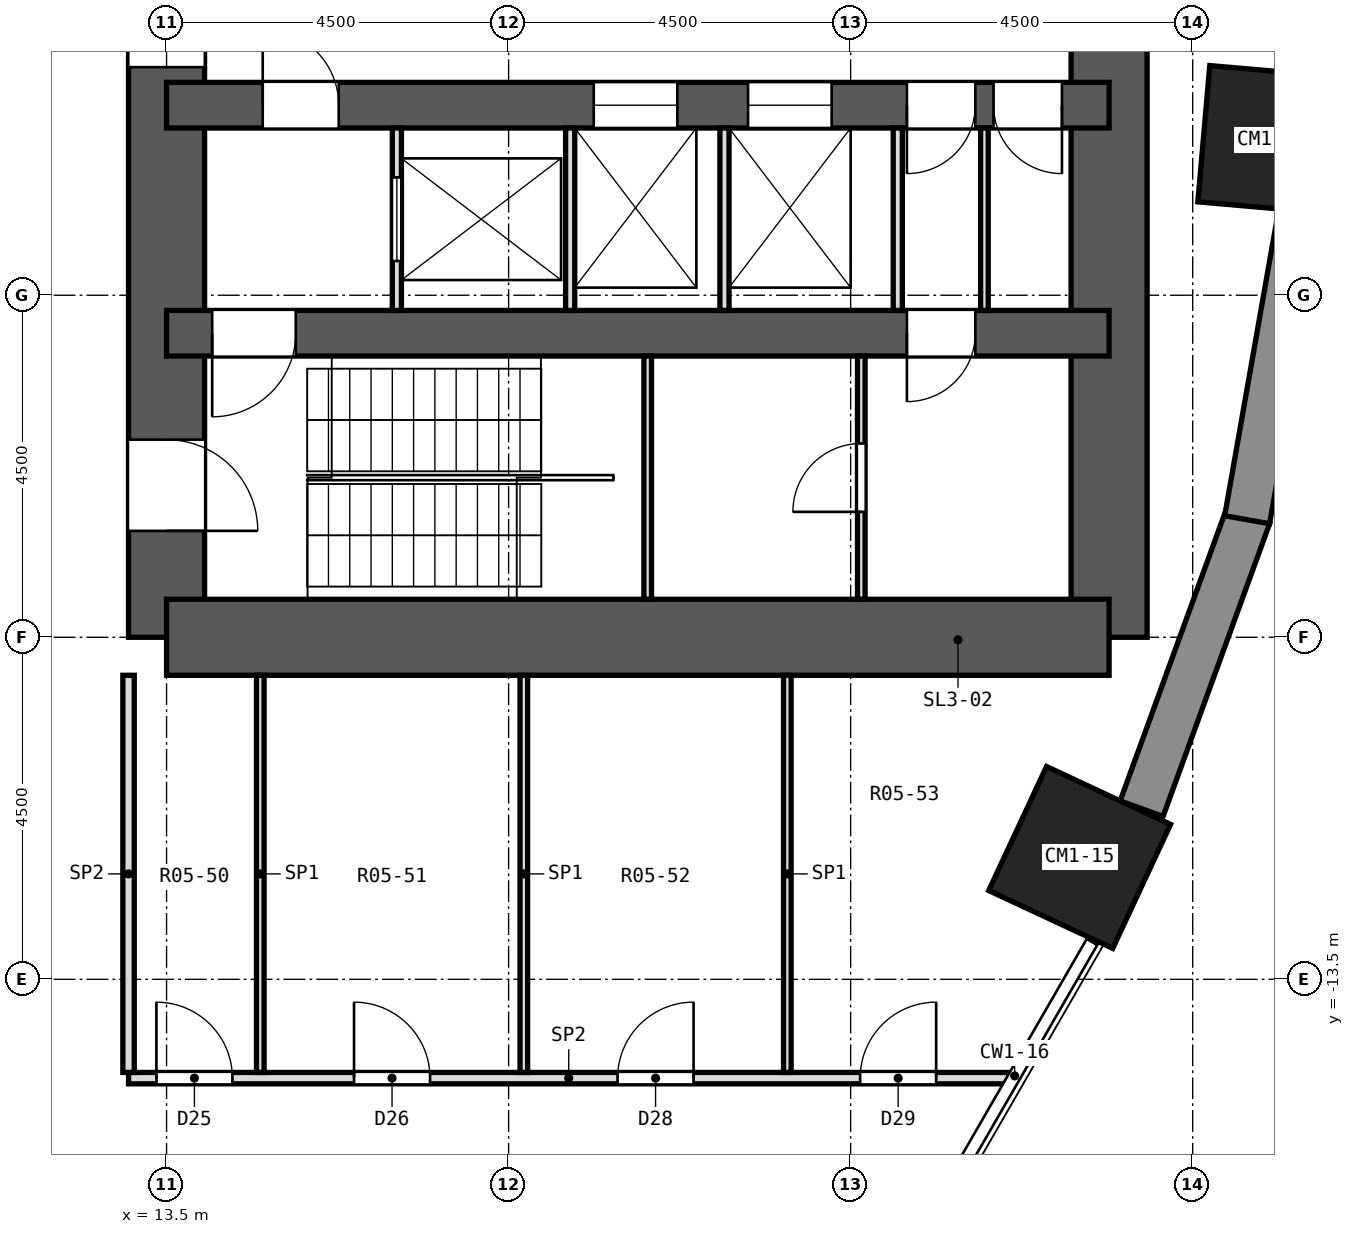
"""IFC4 building model, lengths in metres.
Left out: names, types, materials, properties, quantities, classifications, styles, units other than length and angle.
Written with IfcOpenShell. Run it as: python <this file> out.ifc"""

import sys

from ifc_helpers import new_model, si_unit, direction, frame, frame_2d, origin, origin_2d, place, context, subcontext, project, spatial, rectangle, extrude, element, fill, save


model = new_model("IFC4")
c1 = context("Model", 3, precision=1e-05, world=origin(), true_north=direction((0.0, 1.0)))
c2 = subcontext(c1, "Body", "Model", "MODEL_VIEW")
j1 = project(units=[si_unit("LENGTHUNIT", "METRE"), si_unit("PLANEANGLEUNIT", "RADIAN")], contexts=[c1])
p1 = place(None, origin())
s1 = spatial("IfcSite", under=j1, at=p1, CompositionType="ELEMENT")
p2 = place(p1, origin())
s2 = spatial("IfcBuilding", under=s1, at=p2, CompositionType="ELEMENT")
p3 = place(p2, frame((0.0, 0.0, 9.2)))
s3 = spatial("IfcBuildingStorey", under=s2, at=p3, CompositionType="ELEMENT", Elevation=9.2)
for number, where, z_axis, x_axis in (
    (1, (25.512, -11.897, 0.0), (0.0, 0.0, 1.0), (0.906, -0.423, 0.0)),
    (2, (28.043, -2.453, 0.0), (0.0, 0.0, 1.0), (0.996, -0.087, 0.0)),
):
    element("IfcColumn", number, at=place(p3, frame(where, z_axis=z_axis, x_axis=x_axis)), inside=s3, PredefinedType="COLUMN", context=c2, shape_type="SweptSolid", body=[
        extrude(rectangle(XDim=1.8, YDim=1.8, at=origin_2d()), origin(), (0.0, 0.0, 1.0), 4.2),
    ])
p4 = place(p3, frame((13.5, -9.0, 0.0), z_axis=(0.0, 0.0, 1.0), x_axis=(0.0, 1.0, 0.0)))
e3 = element("IfcWall", 3, at=p4, inside=s3, PredefinedType="SHEAR", context=c2, shape_type="SweptSolid", body=[
    extrude(rectangle(XDim=18.0, YDim=1.0, at=frame_2d((9.0, 0.0))), origin(), (0.0, 0.0, 1.0), 4.2),
])
p5 = place(p4, frame((15.4, 0.0, 0.0)))
e4 = element("IfcOpeningElement", 4, at=p5, cuts=e3, PredefinedType="OPENING", context=c2, shape_type="SweptSolid", body=[
    extrude(rectangle(XDim=1.2, YDim=2.1, at=frame_2d((0.6, 1.05))), frame((0.0, 0.512, 0.0), z_axis=(0.0, -1.0, 0.0), x_axis=(1.0, 0.0, 0.0)), (0.0, 0.0, 1.0), 1.024),
])
p6 = place(p4, frame((1.4, 0.0, 0.0)))
e5 = element("IfcOpeningElement", 5, at=p6, cuts=e3, PredefinedType="OPENING", context=c2, shape_type="SweptSolid", body=[
    extrude(rectangle(XDim=1.2, YDim=2.1, at=frame_2d((0.6, 1.05))), frame((0.0, 0.512, 0.0), z_axis=(0.0, -1.0, 0.0), x_axis=(1.0, 0.0, 0.0)), (0.0, 0.0, 1.0), 1.024),
])
p7 = place(p4, frame((7.5, 0.0, 0.0)))
e6 = element("IfcOpeningElement", 6, at=p7, cuts=e3, PredefinedType="OPENING", context=c2, shape_type="SweptSolid", body=[
    extrude(rectangle(XDim=3.0, YDim=2.4, at=frame_2d((1.5, 1.2))), frame((0.0, 0.512, 0.0), z_axis=(0.0, -1.0, 0.0), x_axis=(1.0, 0.0, 0.0)), (0.0, 0.0, 1.0), 1.024),
])
p8 = place(p3, frame((25.9, -9.0, 0.0), z_axis=(0.0, 0.0, 1.0), x_axis=(0.0, 1.0, 0.0)))
e7 = element("IfcWall", 7, at=p8, inside=s3, PredefinedType="SHEAR", context=c2, shape_type="SweptSolid", body=[
    extrude(rectangle(XDim=18.0, YDim=1.0, at=frame_2d((9.0, 0.0))), origin(), (0.0, 0.0, 1.0), 4.2),
])
p9 = place(p3, frame((13.5, -9.0, 0.0), z_axis=(0.0, 0.0, 1.0), x_axis=(1.0, 0.0, 0.0)))
e8 = element("IfcWall", 8, at=p9, inside=s3, PredefinedType="SHEAR", context=c2, shape_type="SweptSolid", body=[
    extrude(rectangle(XDim=12.4, YDim=1.0, at=frame_2d((6.2, 0.0))), origin(), (0.0, 0.0, 1.0), 4.2),
])
p10 = place(p3, frame((13.5, -5.0, 0.0), z_axis=(0.0, 0.0, 1.0), x_axis=(1.0, 0.0, 0.0)))
e9 = element("IfcWall", 9, at=p10, inside=s3, PredefinedType="SHEAR", context=c2, shape_type="SweptSolid", body=[
    extrude(rectangle(XDim=12.4, YDim=0.6, at=frame_2d((6.2, 0.0))), origin(), (0.0, 0.0, 1.0), 4.2),
])
p11 = place(p10, frame((9.74, 0.0, 0.0)))
e10 = element("IfcOpeningElement", 10, at=p11, cuts=e9, PredefinedType="OPENING", context=c2, shape_type="SweptSolid", body=[
    extrude(rectangle(XDim=0.9, YDim=2.1, at=frame_2d((0.45, 1.05))), frame((0.0, 0.312, 0.0), z_axis=(0.0, -1.0, 0.0), x_axis=(1.0, 0.0, 0.0)), (0.0, 0.0, 1.0), 0.624),
])
p12 = place(p10, frame((0.6, 0.0, 0.0)))
e11 = element("IfcOpeningElement", 11, at=p12, cuts=e9, PredefinedType="OPENING", context=c2, shape_type="SweptSolid", body=[
    extrude(rectangle(XDim=1.1, YDim=2.1, at=frame_2d((0.55, 1.05))), frame((0.0, 0.312, 0.0), z_axis=(0.0, -1.0, 0.0), x_axis=(1.0, 0.0, 0.0)), (0.0, 0.0, 1.0), 0.624),
])
p13 = place(p3, frame((13.5, -2.0, 0.0), z_axis=(0.0, 0.0, 1.0), x_axis=(1.0, 0.0, 0.0)))
e12 = element("IfcWall", 12, at=p13, inside=s3, PredefinedType="SHEAR", context=c2, shape_type="SweptSolid", body=[
    extrude(rectangle(XDim=12.4, YDim=0.6, at=frame_2d((6.2, 0.0))), origin(), (0.0, 0.0, 1.0), 4.2),
])
p14 = place(p13, frame((5.62, 0.0, 0.0)))
e13 = element("IfcOpeningElement", 13, at=p14, cuts=e12, PredefinedType="OPENING", context=c2, shape_type="SweptSolid", body=[
    extrude(rectangle(XDim=1.1, YDim=2.1, at=frame_2d((0.55, 1.05))), frame((0.0, 0.312, 0.0), z_axis=(0.0, -1.0, 0.0), x_axis=(1.0, 0.0, 0.0)), (0.0, 0.0, 1.0), 0.624),
])
p15 = place(p13, frame((7.65, 0.0, 0.0)))
e14 = element("IfcOpeningElement", 14, at=p15, cuts=e12, PredefinedType="OPENING", context=c2, shape_type="SweptSolid", body=[
    extrude(rectangle(XDim=1.1, YDim=2.1, at=frame_2d((0.55, 1.05))), frame((0.0, 0.312, 0.0), z_axis=(0.0, -1.0, 0.0), x_axis=(1.0, 0.0, 0.0)), (0.0, 0.0, 1.0), 0.624),
])
p16 = place(p13, frame((1.265, 0.0, 0.0)))
e15 = element("IfcOpeningElement", 15, at=p16, cuts=e12, PredefinedType="OPENING", context=c2, shape_type="SweptSolid", body=[
    extrude(rectangle(XDim=1.0, YDim=2.1, at=frame_2d((0.5, 1.05))), frame((0.0, 0.312, 0.0), z_axis=(0.0, -1.0, 0.0), x_axis=(1.0, 0.0, 0.0)), (0.0, 0.0, 1.0), 0.624),
])
p17 = place(p13, frame((9.74, 0.0, 0.0)))
e16 = element("IfcOpeningElement", 16, at=p17, cuts=e12, PredefinedType="OPENING", context=c2, shape_type="SweptSolid", body=[
    extrude(rectangle(XDim=0.9, YDim=2.1, at=frame_2d((0.45, 1.05))), frame((0.0, 0.312, 0.0), z_axis=(0.0, -1.0, 0.0), x_axis=(1.0, 0.0, 0.0)), (0.0, 0.0, 1.0), 0.624),
])
p18 = place(p13, frame((10.88, 0.0, 0.0)))
e17 = element("IfcOpeningElement", 17, at=p18, cuts=e12, PredefinedType="OPENING", context=c2, shape_type="SweptSolid", body=[
    extrude(rectangle(XDim=0.9, YDim=2.1, at=frame_2d((0.45, 1.05))), frame((0.0, 0.312, 0.0), z_axis=(0.0, -1.0, 0.0), x_axis=(1.0, 0.0, 0.0)), (0.0, 0.0, 1.0), 0.624),
])
p19 = place(p3, frame((26.328, -11.255, 0.0), z_axis=(0.0, 0.0, 1.0), x_axis=(0.342034744565, 0.939687306241, 0.0)))
e18 = element("IfcWall", 18, at=p19, inside=s3, PredefinedType="SOLIDWALL", context=c2, shape_type="SweptSolid", body=[
    extrude(rectangle(XDim=4.099, YDim=0.6, at=frame_2d((2.05, 0.0))), origin(), (0.0, 0.0, 1.0), 3.65),
])
p20 = place(p3, frame((27.716, -7.454, 0.0), z_axis=(0.0, 0.0, 1.0), x_axis=(0.173673210505, 0.984803338719, 0.0)))
e19 = element("IfcWall", 19, at=p20, inside=s3, PredefinedType="SOLIDWALL", context=c2, shape_type="SweptSolid", body=[
    extrude(rectangle(XDim=4.099, YDim=0.6, at=frame_2d((2.05, 0.0))), origin(), (0.0, 0.0, 1.0), 3.65),
])
p21 = place(p3, frame((13.0, -14.8, 0.0), z_axis=(0.0, 0.0, 1.0), x_axis=(1.0, 0.0, 0.0)))
e20 = element("IfcWall", 20, at=p21, inside=s3, PredefinedType="PARTITIONING", context=c2, shape_type="SweptSolid", body=[
    extrude(rectangle(XDim=11.583, YDim=0.15, at=frame_2d((5.792, 0.0))), origin(), (0.0, 0.0, 1.0), 3.65),
])
p22 = place(p21, frame((0.366, 0.0, 0.0)))
e21 = element("IfcOpeningElement", 21, at=p22, cuts=e20, PredefinedType="OPENING", context=c2, shape_type="SweptSolid", body=[
    extrude(rectangle(XDim=1.0, YDim=2.1, at=frame_2d((0.5, 1.05))), frame((0.0, 0.087, 0.0), z_axis=(0.0, -1.0, 0.0), x_axis=(1.0, 0.0, 0.0)), (0.0, 0.0, 1.0), 0.174),
])
p23 = place(p21, frame((2.967, 0.0, 0.0)))
e22 = element("IfcOpeningElement", 22, at=p23, cuts=e20, PredefinedType="OPENING", context=c2, shape_type="SweptSolid", body=[
    extrude(rectangle(XDim=1.0, YDim=2.1, at=frame_2d((0.5, 1.05))), frame((0.0, 0.087, 0.0), z_axis=(0.0, -1.0, 0.0), x_axis=(1.0, 0.0, 0.0)), (0.0, 0.0, 1.0), 0.174),
])
p24 = place(p21, frame((6.434, 0.0, 0.0)))
e23 = element("IfcOpeningElement", 23, at=p24, cuts=e20, PredefinedType="OPENING", context=c2, shape_type="SweptSolid", body=[
    extrude(rectangle(XDim=1.0, YDim=2.1, at=frame_2d((0.5, 1.05))), frame((0.0, 0.087, 0.0), z_axis=(0.0, -1.0, 0.0), x_axis=(1.0, 0.0, 0.0)), (0.0, 0.0, 1.0), 0.174),
])
p25 = place(p21, frame((9.625, 0.0, 0.0)))
e24 = element("IfcOpeningElement", 24, at=p25, cuts=e20, PredefinedType="OPENING", context=c2, shape_type="SweptSolid", body=[
    extrude(rectangle(XDim=1.0, YDim=2.1, at=frame_2d((0.5, 1.05))), frame((0.0, 0.087, 0.0), z_axis=(0.0, -1.0, 0.0), x_axis=(1.0, 0.0, 0.0)), (0.0, 0.0, 1.0), 0.174),
])
for number, where, z_axis, x_axis in (
    (25, (21.667, -14.725, 0.0), (0.0, 0.0, 1.0), (0.0, 1.0, 0.0)),
    (26, (18.2, -14.725, 0.0), (0.0, 0.0, 1.0), (0.0, 1.0, 0.0)),
    (27, (14.733, -14.725, 0.0), (0.0, 0.0, 1.0), (0.0, 1.0, 0.0)),
):
    element("IfcWall", number, at=place(p3, frame(where, z_axis=z_axis, x_axis=x_axis)), inside=s3, PredefinedType="PARTITIONING", context=c2, shape_type="SweptSolid", body=[
        extrude(rectangle(XDim=5.225, YDim=0.1, at=frame_2d((2.613, 0.0))), origin(), (0.0, 0.0, 1.0), 3.65),
    ])
p26 = place(p3, frame((13.0, -14.725, 0.0), z_axis=(0.0, 0.0, 1.0), x_axis=(0.0, 1.0, 0.0)))
e28 = element("IfcWall", 28, at=p26, inside=s3, PredefinedType="PARTITIONING", context=c2, shape_type="SweptSolid", body=[
    extrude(rectangle(XDim=5.225, YDim=0.15, at=frame_2d((2.613, 0.0))), origin(), (0.0, 0.0, 1.0), 3.65),
])
p27 = place(p3, frame((16.53, -4.7, 0.0), z_axis=(0.0, 0.0, 1.0), x_axis=(0.0, 1.0, 0.0)))
e29 = element("IfcWall", 29, at=p27, inside=s3, PredefinedType="PARTITIONING", context=c2, shape_type="SweptSolid", body=[
    extrude(rectangle(XDim=2.4, YDim=0.12, at=frame_2d((1.2, 0.0))), origin(), (0.0, 0.0, 1.0), 3.65),
])
p28 = place(p27, frame((0.65, 0.0, 0.0)))
e30 = element("IfcOpeningElement", 30, at=p28, cuts=e29, PredefinedType="OPENING", context=c2, shape_type="SweptSolid", body=[
    extrude(rectangle(XDim=1.1, YDim=2.1, at=frame_2d((0.55, 1.05))), frame((0.0, 0.072, 0.0), z_axis=(0.0, -1.0, 0.0), x_axis=(1.0, 0.0, 0.0)), (0.0, 0.0, 1.0), 0.144),
])
for number, where, z_axis, x_axis in (
    (31, (18.81, -4.7, 0.0), (0.0, 0.0, 1.0), (0.0, 1.0, 0.0)),
    (32, (20.84, -4.7, 0.0), (0.0, 0.0, 1.0), (0.0, 1.0, 0.0)),
    (33, (23.12, -4.7, 0.0), (0.0, 0.0, 1.0), (0.0, 1.0, 0.0)),
):
    element("IfcWall", number, at=place(p3, frame(where, z_axis=z_axis, x_axis=x_axis)), inside=s3, PredefinedType="PARTITIONING", context=c2, shape_type="SweptSolid", body=[
        extrude(rectangle(XDim=2.4, YDim=0.12, at=frame_2d((1.2, 0.0))), origin(), (0.0, 0.0, 1.0), 3.65),
    ])
p29 = place(p3, frame((24.26, -4.7, 0.0), z_axis=(0.0, 0.0, 1.0), x_axis=(0.0, 1.0, 0.0)))
e34 = element("IfcWall", 34, at=p29, inside=s3, PredefinedType="PARTITIONING", context=c2, shape_type="SweptSolid", body=[
    extrude(rectangle(XDim=2.4, YDim=0.1, at=frame_2d((1.2, 0.0))), origin(), (0.0, 0.0, 1.0), 3.65),
])
p30 = place(p3, frame((19.83, -8.5, 0.0), z_axis=(0.0, 0.0, 1.0), x_axis=(0.0, 1.0, 0.0)))
e35 = element("IfcWall", 35, at=p30, inside=s3, PredefinedType="PARTITIONING", context=c2, shape_type="SweptSolid", body=[
    extrude(rectangle(XDim=3.2, YDim=0.1, at=frame_2d((1.6, 0.0))), origin(), (0.0, 0.0, 1.0), 3.65),
])
p31 = place(p3, frame((22.64, -8.5, 0.0), z_axis=(0.0, 0.0, 1.0), x_axis=(0.0, 1.0, 0.0)))
e36 = element("IfcWall", 36, at=p31, inside=s3, PredefinedType="PARTITIONING", context=c2, shape_type="SweptSolid", body=[
    extrude(rectangle(XDim=3.2, YDim=0.1, at=frame_2d((1.6, 0.0))), origin(), (0.0, 0.0, 1.0), 3.65),
])
p32 = place(p31, frame((1.15, 0.0, 0.0)))
e37 = element("IfcOpeningElement", 37, at=p32, cuts=e36, PredefinedType="OPENING", context=c2, shape_type="SweptSolid", body=[
    extrude(rectangle(XDim=0.9, YDim=2.1, at=frame_2d((0.45, 1.05))), frame((0.0, 0.062, 0.0), z_axis=(0.0, -1.0, 0.0), x_axis=(1.0, 0.0, 0.0)), (0.0, 0.0, 1.0), 0.124),
])
p33 = place(p22, origin())
e38 = element("IfcDoor", 38, at=p33, inside=s3, OperationType="SINGLE_SWING_LEFT", PredefinedType="DOOR", context=c2, shape_type="SweptSolid", body=[
    extrude(rectangle(XDim=1.0, YDim=2.1, at=frame_2d((0.5, 1.05))), frame((0.0, 0.025, 0.0), z_axis=(0.0, -1.0, 0.0), x_axis=(1.0, 0.0, 0.0)), (0.0, 0.0, 1.0), 0.05),
])
fill(e21, e38)
p34 = place(p23, origin())
e39 = element("IfcDoor", 39, at=p34, inside=s3, OperationType="SINGLE_SWING_LEFT", PredefinedType="DOOR", context=c2, shape_type="SweptSolid", body=[
    extrude(rectangle(XDim=1.0, YDim=2.1, at=frame_2d((0.5, 1.05))), frame((0.0, 0.025, 0.0), z_axis=(0.0, -1.0, 0.0), x_axis=(1.0, 0.0, 0.0)), (0.0, 0.0, 1.0), 0.05),
])
fill(e22, e39)
p35 = place(p24, origin())
e40 = element("IfcDoor", 40, at=p35, inside=s3, OperationType="SINGLE_SWING_RIGHT", PredefinedType="DOOR", context=c2, shape_type="SweptSolid", body=[
    extrude(rectangle(XDim=1.0, YDim=2.1, at=frame_2d((0.5, 1.05))), frame((0.0, 0.025, 0.0), z_axis=(0.0, -1.0, 0.0), x_axis=(1.0, 0.0, 0.0)), (0.0, 0.0, 1.0), 0.05),
])
fill(e23, e40)
p36 = place(p25, origin())
e41 = element("IfcDoor", 41, at=p36, inside=s3, OperationType="SINGLE_SWING_RIGHT", PredefinedType="DOOR", context=c2, shape_type="SweptSolid", body=[
    extrude(rectangle(XDim=1.0, YDim=2.1, at=frame_2d((0.5, 1.05))), frame((0.0, 0.025, 0.0), z_axis=(0.0, -1.0, 0.0), x_axis=(1.0, 0.0, 0.0)), (0.0, 0.0, 1.0), 0.05),
])
fill(e24, e41)
p37 = place(p28, origin())
e42 = element("IfcDoor", 42, at=p37, inside=s3, OperationType="DOUBLE_DOOR_SLIDING", PredefinedType="DOOR", context=c2, shape_type="SweptSolid", body=[
    extrude(rectangle(XDim=1.1, YDim=2.1, at=frame_2d((0.55, 1.05))), frame((0.0, 0.025, 0.0), z_axis=(0.0, -1.0, 0.0), x_axis=(1.0, 0.0, 0.0)), (0.0, 0.0, 1.0), 0.05),
])
fill(e30, e42)
p38 = place(p14, origin())
e43 = element("IfcDoor", 43, at=p38, inside=s3, OperationType="DOUBLE_DOOR_SLIDING", PredefinedType="DOOR", context=c2, shape_type="SweptSolid", body=[
    extrude(rectangle(XDim=1.1, YDim=2.1, at=frame_2d((0.55, 1.05))), frame((0.0, 0.025, 0.0), z_axis=(0.0, -1.0, 0.0), x_axis=(1.0, 0.0, 0.0)), (0.0, 0.0, 1.0), 0.05),
])
fill(e13, e43)
p39 = place(p15, origin())
e44 = element("IfcDoor", 44, at=p39, inside=s3, OperationType="DOUBLE_DOOR_SLIDING", PredefinedType="DOOR", context=c2, shape_type="SweptSolid", body=[
    extrude(rectangle(XDim=1.1, YDim=2.1, at=frame_2d((0.55, 1.05))), frame((0.0, 0.025, 0.0), z_axis=(0.0, -1.0, 0.0), x_axis=(1.0, 0.0, 0.0)), (0.0, 0.0, 1.0), 0.05),
])
fill(e14, e44)
p40 = place(p16, origin())
e45 = element("IfcDoor", 45, at=p40, inside=s3, OperationType="SINGLE_SWING_LEFT", PredefinedType="DOOR", context=c2, shape_type="SweptSolid", body=[
    extrude(rectangle(XDim=1.0, YDim=2.1, at=frame_2d((0.5, 1.05))), frame((0.0, 0.025, 0.0), z_axis=(0.0, -1.0, 0.0), x_axis=(1.0, 0.0, 0.0)), (0.0, 0.0, 1.0), 0.05),
])
fill(e15, e45)
p41 = place(p17, frame((0.9, 0.0, 0.0), z_axis=(0.0, 0.0, 1.0), x_axis=(-1.0, 0.0, 0.0)))
e46 = element("IfcDoor", 46, at=p41, inside=s3, OperationType="SINGLE_SWING_RIGHT", PredefinedType="DOOR", context=c2, shape_type="SweptSolid", body=[
    extrude(rectangle(XDim=0.9, YDim=2.1, at=frame_2d((0.45, 1.05))), frame((0.0, 0.025, 0.0), z_axis=(0.0, -1.0, 0.0), x_axis=(1.0, 0.0, 0.0)), (0.0, 0.0, 1.0), 0.05),
])
fill(e16, e46)
p42 = place(p18, frame((0.9, 0.0, 0.0), z_axis=(0.0, 0.0, 1.0), x_axis=(-1.0, 0.0, 0.0)))
e47 = element("IfcDoor", 47, at=p42, inside=s3, OperationType="SINGLE_SWING_LEFT", PredefinedType="DOOR", context=c2, shape_type="SweptSolid", body=[
    extrude(rectangle(XDim=0.9, YDim=2.1, at=frame_2d((0.45, 1.05))), frame((0.0, 0.025, 0.0), z_axis=(0.0, -1.0, 0.0), x_axis=(1.0, 0.0, 0.0)), (0.0, 0.0, 1.0), 0.05),
])
fill(e17, e47)
p43 = place(p32, origin())
e48 = element("IfcDoor", 48, at=p43, inside=s3, OperationType="SINGLE_SWING_LEFT", PredefinedType="DOOR", context=c2, shape_type="SweptSolid", body=[
    extrude(rectangle(XDim=0.9, YDim=2.1, at=frame_2d((0.45, 1.05))), frame((0.0, 0.025, 0.0), z_axis=(0.0, -1.0, 0.0), x_axis=(1.0, 0.0, 0.0)), (0.0, 0.0, 1.0), 0.05),
])
fill(e37, e48)
p44 = place(p11, frame((0.9, 0.0, 0.0), z_axis=(0.0, 0.0, 1.0), x_axis=(-1.0, 0.0, 0.0)))
e49 = element("IfcDoor", 49, at=p44, inside=s3, OperationType="SINGLE_SWING_RIGHT", PredefinedType="DOOR", context=c2, shape_type="SweptSolid", body=[
    extrude(rectangle(XDim=0.9, YDim=2.1, at=frame_2d((0.45, 1.05))), frame((0.0, 0.025, 0.0), z_axis=(0.0, -1.0, 0.0), x_axis=(1.0, 0.0, 0.0)), (0.0, 0.0, 1.0), 0.05),
])
fill(e10, e49)
p45 = place(p12, frame((1.1, 0.0, 0.0), z_axis=(0.0, 0.0, 1.0), x_axis=(-1.0, 0.0, 0.0)))
e50 = element("IfcDoor", 50, at=p45, inside=s3, OperationType="SINGLE_SWING_RIGHT", PredefinedType="DOOR", context=c2, shape_type="SweptSolid", body=[
    extrude(rectangle(XDim=1.1, YDim=2.1, at=frame_2d((0.55, 1.05))), frame((0.0, 0.025, 0.0), z_axis=(0.0, -1.0, 0.0), x_axis=(1.0, 0.0, 0.0)), (0.0, 0.0, 1.0), 0.05),
])
fill(e11, e50)
p46 = place(p6, frame((1.2, 0.0, 0.0), z_axis=(0.0, 0.0, 1.0), x_axis=(-1.0, 0.0, 0.0)))
e51 = element("IfcDoor", 51, at=p46, inside=s3, OperationType="SINGLE_SWING_RIGHT", PredefinedType="DOOR", context=c2, shape_type="SweptSolid", body=[
    extrude(rectangle(XDim=1.2, YDim=2.1, at=frame_2d((0.6, 1.05))), frame((0.0, 0.025, 0.0), z_axis=(0.0, -1.0, 0.0), x_axis=(1.0, 0.0, 0.0)), (0.0, 0.0, 1.0), 0.05),
])
fill(e5, e51)
p47 = place(p7, origin())
e52 = element("IfcDoor", 52, at=p47, inside=s3, OperationType="DOUBLE_DOOR_SLIDING", PredefinedType="DOOR", context=c2, shape_type="SweptSolid", body=[
    extrude(rectangle(XDim=3.0, YDim=2.4, at=frame_2d((1.5, 1.2))), frame((0.0, 0.025, 0.0), z_axis=(0.0, -1.0, 0.0), x_axis=(1.0, 0.0, 0.0)), (0.0, 0.0, 1.0), 0.05),
])
fill(e6, e52)
save(model, sys.argv[1])
